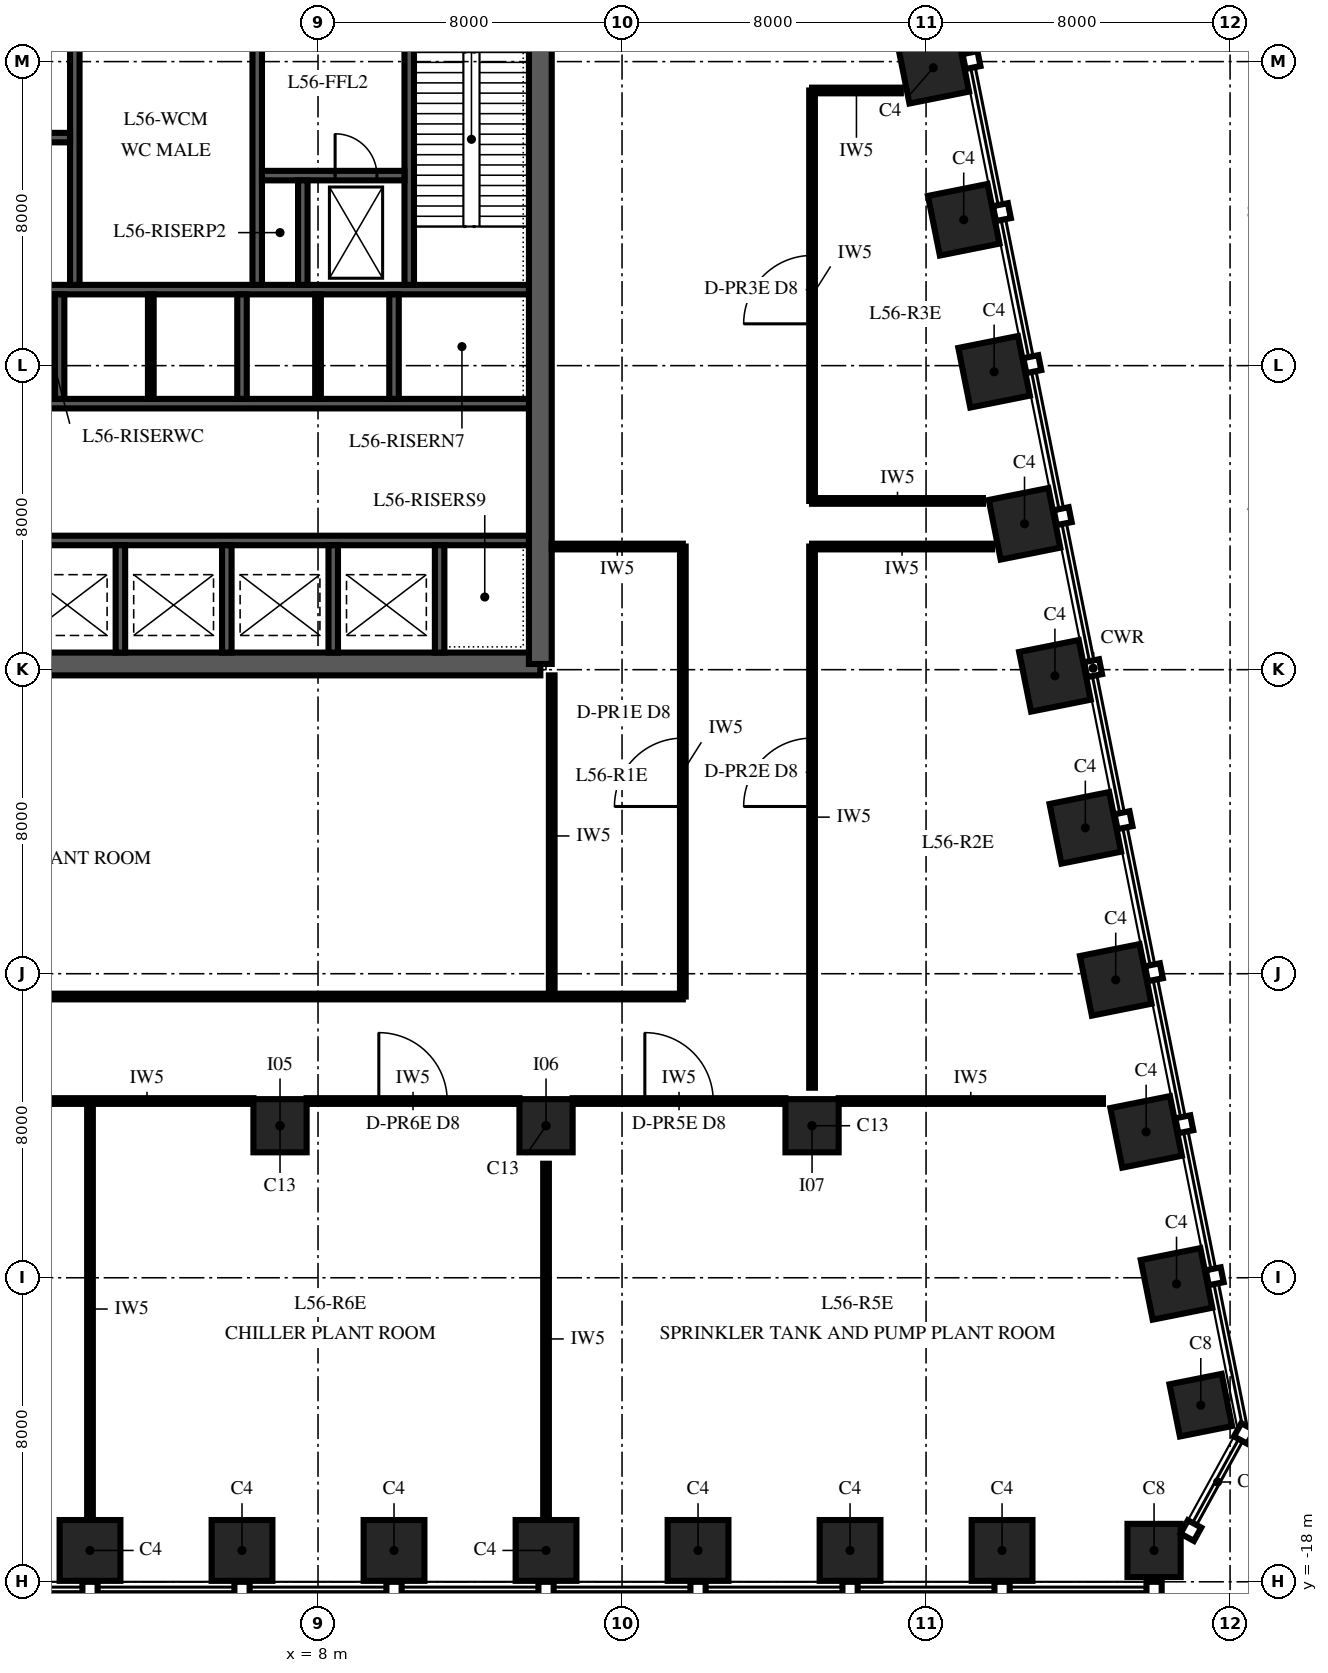
"""IFC4 building model, lengths in metres.
Left out: names, types, materials, properties, quantities, classifications, styles, units other than length and angle.
Written with IfcOpenShell. Run it as: python <this file> out.ifc"""

import sys

from ifc_helpers import new_model, si_unit, direction, frame, frame_2d, origin, origin_2d, place, context, subcontext, project, spatial, polyline, rectangle, outline, extrude, element, fill, save


model = new_model("IFC4")
c1 = context("Model", 3, precision=1e-05, world=origin(), true_north=direction((0.0, 1.0)))
c2 = subcontext(c1, "Body", "Model", "MODEL_VIEW")
j1 = project(units=[si_unit("LENGTHUNIT", "METRE"), si_unit("PLANEANGLEUNIT", "RADIAN")], contexts=[c1])
p1 = place(None, origin())
s1 = spatial("IfcSite", under=j1, at=p1, CompositionType="ELEMENT")
p2 = place(p1, origin())
s2 = spatial("IfcBuilding", under=s1, at=p2, CompositionType="ELEMENT")
p3 = place(p2, frame((0.0, 0.0, 242.0)))
s3 = spatial("IfcBuildingStorey", under=s2, at=p3, CompositionType="ELEMENT", Elevation=242.0)
for number, where, z_axis, x_axis in (
    (1, (2.0, -17.175, 0.0), (0.0, 0.0, 1.0), (1.0, 0.0, 0.0)),
    (2, (6.0, -17.175, 0.0), (0.0, 0.0, 1.0), (1.0, 0.0, 0.0)),
    (3, (10.0, -17.175, 0.0), (0.0, 0.0, 1.0), (1.0, 0.0, 0.0)),
    (4, (14.0, -17.175, 0.0), (0.0, 0.0, 1.0), (1.0, 0.0, 0.0)),
    (5, (18.0, -17.175, 0.0), (0.0, 0.0, 1.0), (1.0, 0.0, 0.0)),
    (6, (22.0, -17.175, 0.0), (0.0, 0.0, 1.0), (1.0, 0.0, 0.0)),
    (7, (26.0, -17.175, 0.0), (0.0, 0.0, 1.0), (1.0, 0.0, 0.0)),
):
    element("IfcColumn", number, at=place(p3, frame(where, z_axis=z_axis, x_axis=x_axis)), inside=s3, PredefinedType="COLUMN", context=c2, shape_type="SweptSolid", body=[
        extrude(rectangle(XDim=1.6, YDim=1.6, at=origin_2d()), origin(), (0.0, 0.0, 1.0), 6.0),
    ])
for number, where, z_axis, x_axis in (
    (8, (30.0, -17.175, 0.0), (0.0, 0.0, 1.0), (1.0, 0.0, 0.0)),
    (9, (31.229, -13.353, 0.0), (0.0, 0.0, 1.0), (-0.196, 0.981, 0.0)),
):
    element("IfcColumn", number, at=place(p3, frame(where, z_axis=z_axis, x_axis=x_axis)), inside=s3, PredefinedType="COLUMN", context=c2, shape_type="SweptSolid", body=[
        extrude(rectangle(XDim=1.4, YDim=1.4, at=origin_2d()), origin(), (0.0, 0.0, 1.0), 6.0),
    ])
for number, where, z_axis, x_axis in (
    (10, (30.591, -10.162, 0.0), (0.0, 0.0, 1.0), (-0.196, 0.981, 0.0)),
    (11, (29.791, -6.162, 0.0), (0.0, 0.0, 1.0), (-0.196, 0.981, 0.0)),
    (12, (28.991, -2.162, 0.0), (0.0, 0.0, 1.0), (-0.196, 0.981, 0.0)),
    (13, (28.191, 1.838, 0.0), (0.0, 0.0, 1.0), (-0.196, 0.981, 0.0)),
    (14, (27.391, 5.838, 0.0), (0.0, 0.0, 1.0), (-0.196, 0.981, 0.0)),
    (15, (26.591, 9.838, 0.0), (0.0, 0.0, 1.0), (-0.196, 0.981, 0.0)),
    (16, (25.791, 13.838, 0.0), (0.0, 0.0, 1.0), (-0.196, 0.981, 0.0)),
    (17, (24.991, 17.838, 0.0), (0.0, 0.0, 1.0), (-0.196, 0.981, 0.0)),
    (18, (24.191, 21.838, 0.0), (0.0, 0.0, 1.0), (-0.196, 0.981, 0.0)),
):
    element("IfcColumn", number, at=place(p3, frame(where, z_axis=z_axis, x_axis=x_axis)), inside=s3, PredefinedType="COLUMN", context=c2, shape_type="SweptSolid", body=[
        extrude(rectangle(XDim=1.6, YDim=1.6, at=origin_2d()), origin(), (0.0, 0.0, 1.0), 6.0),
    ])
for number, where, z_axis, x_axis in (
    (19, (7.0, -6.0, 0.0), (0.0, 0.0, 1.0), (1.0, 0.0, 0.0)),
    (20, (14.0, -6.0, 0.0), (0.0, 0.0, 1.0), (1.0, 0.0, 0.0)),
    (21, (21.0, -6.0, 0.0), (0.0, 0.0, 1.0), (1.0, 0.0, 0.0)),
):
    element("IfcColumn", number, at=place(p3, frame(where, z_axis=z_axis, x_axis=x_axis)), inside=s3, PredefinedType="COLUMN", context=c2, shape_type="SweptSolid", body=[
        extrude(rectangle(XDim=1.4, YDim=1.4, at=origin_2d()), origin(), (0.0, 0.0, 1.0), 6.0),
    ])
p4 = place(p3, frame((-13.85, 6.15, 0.0), z_axis=(0.0, 0.0, 1.0), x_axis=(1.0, 0.0, 0.0)))
e22 = element("IfcWall", 22, at=p4, inside=s3, PredefinedType="SHEAR", context=c2, shape_type="SweptSolid", body=[
    extrude(rectangle(XDim=27.7, YDim=0.6, at=frame_2d((13.85, 0.0))), origin(), (0.0, 0.0, 1.0), 6.0),
])
p5 = place(p3, frame((13.85, 6.15, 0.0), z_axis=(0.0, 0.0, 1.0), x_axis=(0.0, 1.0, 0.0)))
e23 = element("IfcWall", 23, at=p5, inside=s3, PredefinedType="SHEAR", context=c2, shape_type="SweptSolid", body=[
    extrude(outline(polyline([(0.0, -0.3), (17.7, -0.3), (17.7, 0.0), (17.4, 0.0), (17.4, 0.3), (0.3, 0.3), (0.3, 0.0), (0.0, 0.0), (0.0, -0.3)])), origin(), (0.0, 0.0, 1.0), 6.0),
])
for number, where, z_axis, x_axis in (
    (24, (-13.55, 9.4, 0.0), (0.0, 0.0, 1.0), (1.0, 0.0, 0.0)),
    (25, (-13.55, 13.0, 0.0), (0.0, 0.0, 1.0), (1.0, 0.0, 0.0)),
    (26, (-13.55, 16.0, 0.0), (0.0, 0.0, 1.0), (1.0, 0.0, 0.0)),
):
    element("IfcWall", number, at=place(p3, frame(where, z_axis=z_axis, x_axis=x_axis)), inside=s3, PredefinedType="SHEAR", context=c2, shape_type="SweptSolid", body=[
        extrude(rectangle(XDim=27.1, YDim=0.25, at=frame_2d((13.55, 0.0))), origin(), (0.0, 0.0, 1.0), 6.0),
    ])
for number, where, z_axis, x_axis in (
    (27, (2.8, 6.45, 0.0), (0.0, 0.0, 1.0), (0.0, 1.0, 0.0)),
    (28, (5.6, 6.45, 0.0), (0.0, 0.0, 1.0), (0.0, 1.0, 0.0)),
    (29, (8.4, 6.45, 0.0), (0.0, 0.0, 1.0), (0.0, 1.0, 0.0)),
    (30, (11.2, 6.45, 0.0), (0.0, 0.0, 1.0), (0.0, 1.0, 0.0)),
):
    element("IfcWall", number, at=place(p3, frame(where, z_axis=z_axis, x_axis=x_axis)), inside=s3, PredefinedType="SHEAR", context=c2, shape_type="SweptSolid", body=[
        extrude(rectangle(XDim=2.825, YDim=0.25, at=frame_2d((1.413, 0.0))), origin(), (0.0, 0.0, 1.0), 6.0),
    ])
for number, where, z_axis, x_axis in (
    (31, (1.2, 13.125, 0.0), (0.0, 0.0, 1.0), (0.0, 1.0, 0.0)),
    (32, (6.0, 13.125, 0.0), (0.0, 0.0, 1.0), (0.0, 1.0, 0.0)),
    (33, (10.0, 13.125, 0.0), (0.0, 0.0, 1.0), (0.0, 1.0, 0.0)),
):
    element("IfcWall", number, at=place(p3, frame(where, z_axis=z_axis, x_axis=x_axis)), inside=s3, PredefinedType="SHEAR", context=c2, shape_type="SweptSolid", body=[
        extrude(rectangle(XDim=2.75, YDim=0.25, at=frame_2d((1.375, 0.0))), origin(), (0.0, 0.0, 1.0), 6.0),
    ])
for number, where, z_axis, x_axis in (
    (34, (1.6, 16.125, 0.0), (0.0, 0.0, 1.0), (0.0, 1.0, 0.0)),
    (35, (6.4, 16.125, 0.0), (0.0, 0.0, 1.0), (0.0, 1.0, 0.0)),
):
    element("IfcWall", number, at=place(p3, frame(where, z_axis=z_axis, x_axis=x_axis)), inside=s3, PredefinedType="SHEAR", context=c2, shape_type="SweptSolid", body=[
        extrude(rectangle(XDim=7.425, YDim=0.25, at=frame_2d((3.712, 0.0))), origin(), (0.0, 0.0, 1.0), 6.0),
    ])
p6 = place(p3, frame((10.4, 16.125, 0.0), z_axis=(0.0, 0.0, 1.0), x_axis=(0.0, 1.0, 0.0)))
e36 = element("IfcWall", 36, at=p6, inside=s3, PredefinedType="SHEAR", context=c2, shape_type="SweptSolid", body=[
    extrude(rectangle(XDim=7.425, YDim=0.25, at=frame_2d((3.712, 0.0))), origin(), (0.0, 0.0, 1.0), 6.0),
])
p7 = place(p6, frame((6.225, 0.0, 0.0)))
e37 = element("IfcOpeningElement", 37, at=p7, cuts=e36, PredefinedType="OPENING", context=c2, shape_type="SweptSolid", body=[
    extrude(rectangle(XDim=1.0, YDim=2.1, at=frame_2d((0.5, 1.05))), frame((0.0, 0.14, 0.0), z_axis=(0.0, -1.0, 0.0), x_axis=(1.0, 0.0, 0.0)), (0.0, 0.0, 1.0), 0.28),
])
p8 = place(p3, frame((6.525, 19.0, 0.0), z_axis=(0.0, 0.0, 1.0), x_axis=(1.0, 0.0, 0.0)))
e38 = element("IfcWall", 38, at=p8, inside=s3, PredefinedType="SHEAR", context=c2, shape_type="SweptSolid", body=[
    extrude(rectangle(XDim=3.75, YDim=0.25, at=frame_2d((1.875, 0.0))), origin(), (0.0, 0.0, 1.0), 6.0),
])
p9 = place(p8, frame((1.925, 0.0, 0.0)))
e39 = element("IfcOpeningElement", 39, at=p9, cuts=e38, PredefinedType="OPENING", context=c2, shape_type="SweptSolid", body=[
    extrude(rectangle(XDim=1.1, YDim=2.1, at=frame_2d((0.55, 1.05))), frame((0.0, 0.14, 0.0), z_axis=(0.0, -1.0, 0.0), x_axis=(1.0, 0.0, 0.0)), (0.0, 0.0, 1.0), 0.28),
])
p10 = place(p3, frame((7.6, 16.125, 0.0), z_axis=(0.0, 0.0, 1.0), x_axis=(0.0, 1.0, 0.0)))
e40 = element("IfcWall", 40, at=p10, inside=s3, PredefinedType="SHEAR", context=c2, shape_type="SweptSolid", body=[
    extrude(rectangle(XDim=2.75, YDim=0.25, at=frame_2d((1.375, 0.0))), origin(), (0.0, 0.0, 1.0), 6.0),
])
p11 = place(p3, frame((-1.475, 20.0, 0.0), z_axis=(0.0, 0.0, 1.0), x_axis=(1.0, 0.0, 0.0)))
e41 = element("IfcWall", 41, at=p11, inside=s3, PredefinedType="SHEAR", context=c2, shape_type="SweptSolid", body=[
    extrude(rectangle(XDim=2.95, YDim=0.25, at=frame_2d((1.475, 0.0))), origin(), (0.0, 0.0, 1.0), 6.0),
])
for number, where, z_axis, x_axis in (
    (42, (3.6, 13.125, 0.0), (0.0, 0.0, 1.0), (0.0, 1.0, 0.0)),
    (43, (8.0, 13.125, 0.0), (0.0, 0.0, 1.0), (0.0, 1.0, 0.0)),
):
    element("IfcWall", number, at=place(p3, frame(where, z_axis=z_axis, x_axis=x_axis)), inside=s3, PredefinedType="PARTITIONING", context=c2, shape_type="SweptSolid", body=[
        extrude(rectangle(XDim=2.75, YDim=0.15, at=frame_2d((1.375, 0.0))), origin(), (0.0, 0.0, 1.0), 5.85),
    ])
p12 = place(p3, frame((17.6, -2.6, 0.0), z_axis=(0.0, 0.0, 1.0), x_axis=(0.0, 1.0, 0.0)))
e44 = element("IfcWall", 44, at=p12, inside=s3, PredefinedType="PARTITIONING", context=c2, shape_type="SweptSolid", body=[
    extrude(rectangle(XDim=11.84, YDim=0.15, at=frame_2d((5.92, 0.0))), origin(), (0.0, 0.0, 1.0), 5.85),
])
p13 = place(p12, frame((5.0, 0.0, 0.0)))
e45 = element("IfcOpeningElement", 45, at=p13, cuts=e44, PredefinedType="OPENING", context=c2, shape_type="SweptSolid", body=[
    extrude(rectangle(XDim=1.8, YDim=2.4, at=frame_2d((0.9, 1.2))), frame((0.0, 0.09, 0.0), z_axis=(0.0, -1.0, 0.0), x_axis=(1.0, 0.0, 0.0)), (0.0, 0.0, 1.0), 0.18),
])
p14 = place(p3, frame((21.0, -5.0, 0.0), z_axis=(0.0, 0.0, 1.0), x_axis=(0.0, 1.0, 0.0)))
e46 = element("IfcWall", 46, at=p14, inside=s3, PredefinedType="PARTITIONING", context=c2, shape_type="SweptSolid", body=[
    extrude(rectangle(XDim=14.24, YDim=0.15, at=frame_2d((7.12, 0.0))), origin(), (0.0, 0.0, 1.0), 5.85),
])
p15 = place(p14, frame((7.4, 0.0, 0.0)))
e47 = element("IfcOpeningElement", 47, at=p15, cuts=e46, PredefinedType="OPENING", context=c2, shape_type="SweptSolid", body=[
    extrude(rectangle(XDim=1.8, YDim=2.4, at=frame_2d((0.9, 1.2))), frame((0.0, 0.09, 0.0), z_axis=(0.0, -1.0, 0.0), x_axis=(1.0, 0.0, 0.0)), (0.0, 0.0, 1.0), 0.18),
])
p16 = place(p3, frame((21.0, 10.44, 0.0), z_axis=(0.0, 0.0, 1.0), x_axis=(0.0, 1.0, 0.0)))
e48 = element("IfcWall", 48, at=p16, inside=s3, PredefinedType="PARTITIONING", context=c2, shape_type="SweptSolid", body=[
    extrude(rectangle(XDim=10.8, YDim=0.15, at=frame_2d((5.4, 0.0))), origin(), (0.0, 0.0, 1.0), 5.85),
])
p17 = place(p16, frame((4.66, 0.0, 0.0)))
e49 = element("IfcOpeningElement", 49, at=p17, cuts=e48, PredefinedType="OPENING", context=c2, shape_type="SweptSolid", body=[
    extrude(rectangle(XDim=1.8, YDim=2.4, at=frame_2d((0.9, 1.2))), frame((0.0, 0.09, 0.0), z_axis=(0.0, -1.0, 0.0), x_axis=(1.0, 0.0, 0.0)), (0.0, 0.0, 1.0), 0.18),
])
p18 = place(p3, frame((14.15, -2.6, 0.0), z_axis=(0.0, 0.0, 1.0), x_axis=(0.0, 1.0, 0.0)))
e50 = element("IfcWall", 50, at=p18, inside=s3, PredefinedType="PARTITIONING", context=c2, shape_type="SweptSolid", body=[
    extrude(rectangle(XDim=8.45, YDim=0.15, at=frame_2d((4.225, 0.0))), origin(), (0.0, 0.0, 1.0), 5.85),
])
p19 = place(p3, frame((14.15, 9.24, 0.0), z_axis=(0.0, 0.0, 1.0), x_axis=(1.0, 0.0, 0.0)))
e51 = element("IfcWall", 51, at=p19, inside=s3, PredefinedType="PARTITIONING", context=c2, shape_type="SweptSolid", body=[
    extrude(rectangle(XDim=3.45, YDim=0.15, at=frame_2d((1.725, 0.0))), origin(), (0.0, 0.0, 1.0), 5.25),
])
p20 = place(p3, frame((21.0, 9.24, 0.0), z_axis=(0.0, 0.0, 1.0), x_axis=(1.0, 0.0, 0.0)))
e52 = element("IfcWall", 52, at=p20, inside=s3, PredefinedType="PARTITIONING", context=c2, shape_type="SweptSolid", body=[
    extrude(rectangle(XDim=4.737, YDim=0.15, at=frame_2d((2.368, 0.0))), origin(), (0.0, 0.0, 1.0), 5.85),
])
p21 = place(p3, frame((21.0, 10.44, 0.0), z_axis=(0.0, 0.0, 1.0), x_axis=(1.0, 0.0, 0.0)))
e53 = element("IfcWall", 53, at=p21, inside=s3, PredefinedType="PARTITIONING", context=c2, shape_type="SweptSolid", body=[
    extrude(rectangle(XDim=4.497, YDim=0.15, at=frame_2d((2.248, 0.0))), origin(), (0.0, 0.0, 1.0), 5.85),
])
p22 = place(p3, frame((21.0, 21.24, 0.0), z_axis=(0.0, 0.0, 1.0), x_axis=(1.0, 0.0, 0.0)))
e54 = element("IfcWall", 54, at=p22, inside=s3, PredefinedType="PARTITIONING", context=c2, shape_type="SweptSolid", body=[
    extrude(rectangle(XDim=2.337, YDim=0.15, at=frame_2d((1.168, 0.0))), origin(), (0.0, 0.0, 1.0), 5.85),
])
p23 = place(p3, frame((14.0, -7.0, 0.0), z_axis=(0.0, 0.0, 1.0), x_axis=(0.0, -1.0, 0.0)))
e55 = element("IfcWall", 55, at=p23, inside=s3, PredefinedType="PARTITIONING", context=c2, shape_type="SweptSolid", body=[
    extrude(rectangle(XDim=9.22, YDim=0.15, at=frame_2d((4.61, 0.0))), origin(), (0.0, 0.0, 1.0), 5.25),
])
p24 = place(p3, frame((0.7, -5.35, 0.0), z_axis=(0.0, 0.0, 1.0), x_axis=(1.0, 0.0, 0.0)))
e56 = element("IfcWall", 56, at=p24, inside=s3, PredefinedType="PARTITIONING", context=c2, shape_type="SweptSolid", body=[
    extrude(rectangle(XDim=5.6, YDim=0.15, at=frame_2d((2.8, 0.0))), origin(), (0.0, 0.0, 1.0), 5.85),
])
p25 = place(p3, frame((7.7, -5.35, 0.0), z_axis=(0.0, 0.0, 1.0), x_axis=(1.0, 0.0, 0.0)))
e57 = element("IfcWall", 57, at=p25, inside=s3, PredefinedType="PARTITIONING", context=c2, shape_type="SweptSolid", body=[
    extrude(rectangle(XDim=5.6, YDim=0.15, at=frame_2d((2.8, 0.0))), origin(), (0.0, 0.0, 1.0), 5.85),
])
p26 = place(p25, frame((1.9, 0.0, 0.0)))
e58 = element("IfcOpeningElement", 58, at=p26, cuts=e57, PredefinedType="OPENING", context=c2, shape_type="SweptSolid", body=[
    extrude(rectangle(XDim=1.8, YDim=2.4, at=frame_2d((0.9, 1.2))), frame((0.0, 0.09, 0.0), z_axis=(0.0, -1.0, 0.0), x_axis=(1.0, 0.0, 0.0)), (0.0, 0.0, 1.0), 0.18),
])
p27 = place(p3, frame((14.7, -5.35, 0.0), z_axis=(0.0, 0.0, 1.0), x_axis=(1.0, 0.0, 0.0)))
e59 = element("IfcWall", 59, at=p27, inside=s3, PredefinedType="PARTITIONING", context=c2, shape_type="SweptSolid", body=[
    extrude(rectangle(XDim=5.6, YDim=0.15, at=frame_2d((2.8, 0.0))), origin(), (0.0, 0.0, 1.0), 5.85),
])
p28 = place(p27, frame((1.9, 0.0, 0.0)))
e60 = element("IfcOpeningElement", 60, at=p28, cuts=e59, PredefinedType="OPENING", context=c2, shape_type="SweptSolid", body=[
    extrude(rectangle(XDim=1.8, YDim=2.4, at=frame_2d((0.9, 1.2))), frame((0.0, 0.09, 0.0), z_axis=(0.0, -1.0, 0.0), x_axis=(1.0, 0.0, 0.0)), (0.0, 0.0, 1.0), 0.18),
])
p29 = place(p3, frame((21.7, -5.35, 0.0), z_axis=(0.0, 0.0, 1.0), x_axis=(1.0, 0.0, 0.0)))
e61 = element("IfcWall", 61, at=p29, inside=s3, PredefinedType="PARTITIONING", context=c2, shape_type="SweptSolid", body=[
    extrude(rectangle(XDim=6.955, YDim=0.15, at=frame_2d((3.478, 0.0))), origin(), (0.0, 0.0, 1.0), 5.85),
])
p30 = place(p3, frame((-17.6, -2.6, 0.0), z_axis=(0.0, 0.0, 1.0), x_axis=(1.0, 0.0, 0.0)))
e62 = element("IfcWall", 62, at=p30, inside=s3, PredefinedType="PARTITIONING", context=c2, shape_type="SweptSolid", body=[
    extrude(rectangle(XDim=35.2, YDim=0.15, at=frame_2d((17.6, 0.0))), origin(), (0.0, 0.0, 1.0), 5.85),
])
p31 = place(p30, frame((13.7, 0.0, 0.0)))
e63 = element("IfcOpeningElement", 63, at=p31, cuts=e62, PredefinedType="OPENING", context=c2, shape_type="SweptSolid", body=[
    extrude(rectangle(XDim=1.8, YDim=2.4, at=frame_2d((0.9, 1.2))), frame((0.0, 0.09, 0.0), z_axis=(0.0, -1.0, 0.0), x_axis=(1.0, 0.0, 0.0)), (0.0, 0.0, 1.0), 0.18),
])
p32 = place(p3, frame((2.0, -5.425, 0.0), z_axis=(0.0, 0.0, 1.0), x_axis=(0.0, -1.0, 0.0)))
e64 = element("IfcWall", 64, at=p32, inside=s3, PredefinedType="PARTITIONING", context=c2, shape_type="SweptSolid", body=[
    extrude(rectangle(XDim=10.795, YDim=0.15, at=frame_2d((5.397, 0.0))), origin(), (0.0, 0.0, 1.0), 5.25),
])
p33 = place(p9, origin())
e65 = element("IfcDoor", 65, at=p33, inside=s3, OperationType="SLIDING_TO_RIGHT", PredefinedType="DOOR", context=c2, shape_type="SweptSolid", body=[
    extrude(rectangle(XDim=1.1, YDim=2.1, at=frame_2d((0.55, 1.05))), frame((0.0, 0.125, 0.0), z_axis=(0.0, -1.0, 0.0), x_axis=(1.0, 0.0, 0.0)), (0.0, 0.0, 1.0), 0.25),
])
fill(e39, e65)
p34 = place(p13, origin())
e66 = element("IfcDoor", 66, at=p34, inside=s3, OperationType="DOUBLE_DOOR_SINGLE_SWING", PredefinedType="DOOR", context=c2, shape_type="SweptSolid", body=[
    extrude(rectangle(XDim=1.8, YDim=2.4, at=frame_2d((0.9, 1.2))), frame((0.0, 0.075, 0.0), z_axis=(0.0, -1.0, 0.0), x_axis=(1.0, 0.0, 0.0)), (0.0, 0.0, 1.0), 0.149),
])
fill(e45, e66)
p35 = place(p15, origin())
e67 = element("IfcDoor", 67, at=p35, inside=s3, OperationType="DOUBLE_DOOR_SINGLE_SWING", PredefinedType="DOOR", context=c2, shape_type="SweptSolid", body=[
    extrude(rectangle(XDim=1.8, YDim=2.4, at=frame_2d((0.9, 1.2))), frame((0.0, 0.075, 0.0), z_axis=(0.0, -1.0, 0.0), x_axis=(1.0, 0.0, 0.0)), (0.0, 0.0, 1.0), 0.149),
])
fill(e47, e67)
p36 = place(p17, origin())
e68 = element("IfcDoor", 68, at=p36, inside=s3, OperationType="DOUBLE_DOOR_SINGLE_SWING", PredefinedType="DOOR", context=c2, shape_type="SweptSolid", body=[
    extrude(rectangle(XDim=1.8, YDim=2.4, at=frame_2d((0.9, 1.2))), frame((0.0, 0.075, 0.0), z_axis=(0.0, -1.0, 0.0), x_axis=(1.0, 0.0, 0.0)), (0.0, 0.0, 1.0), 0.149),
])
fill(e49, e68)
p37 = place(p28, origin())
e69 = element("IfcDoor", 69, at=p37, inside=s3, OperationType="DOUBLE_DOOR_SINGLE_SWING", PredefinedType="DOOR", context=c2, shape_type="SweptSolid", body=[
    extrude(rectangle(XDim=1.8, YDim=2.4, at=frame_2d((0.9, 1.2))), frame((0.0, 0.075, 0.0), z_axis=(0.0, -1.0, 0.0), x_axis=(1.0, 0.0, 0.0)), (0.0, 0.0, 1.0), 0.149),
])
fill(e60, e69)
p38 = place(p26, origin())
e70 = element("IfcDoor", 70, at=p38, inside=s3, OperationType="DOUBLE_DOOR_SINGLE_SWING", PredefinedType="DOOR", context=c2, shape_type="SweptSolid", body=[
    extrude(rectangle(XDim=1.8, YDim=2.4, at=frame_2d((0.9, 1.2))), frame((0.0, 0.075, 0.0), z_axis=(0.0, -1.0, 0.0), x_axis=(1.0, 0.0, 0.0)), (0.0, 0.0, 1.0), 0.149),
])
fill(e58, e70)
save(model, sys.argv[1])
